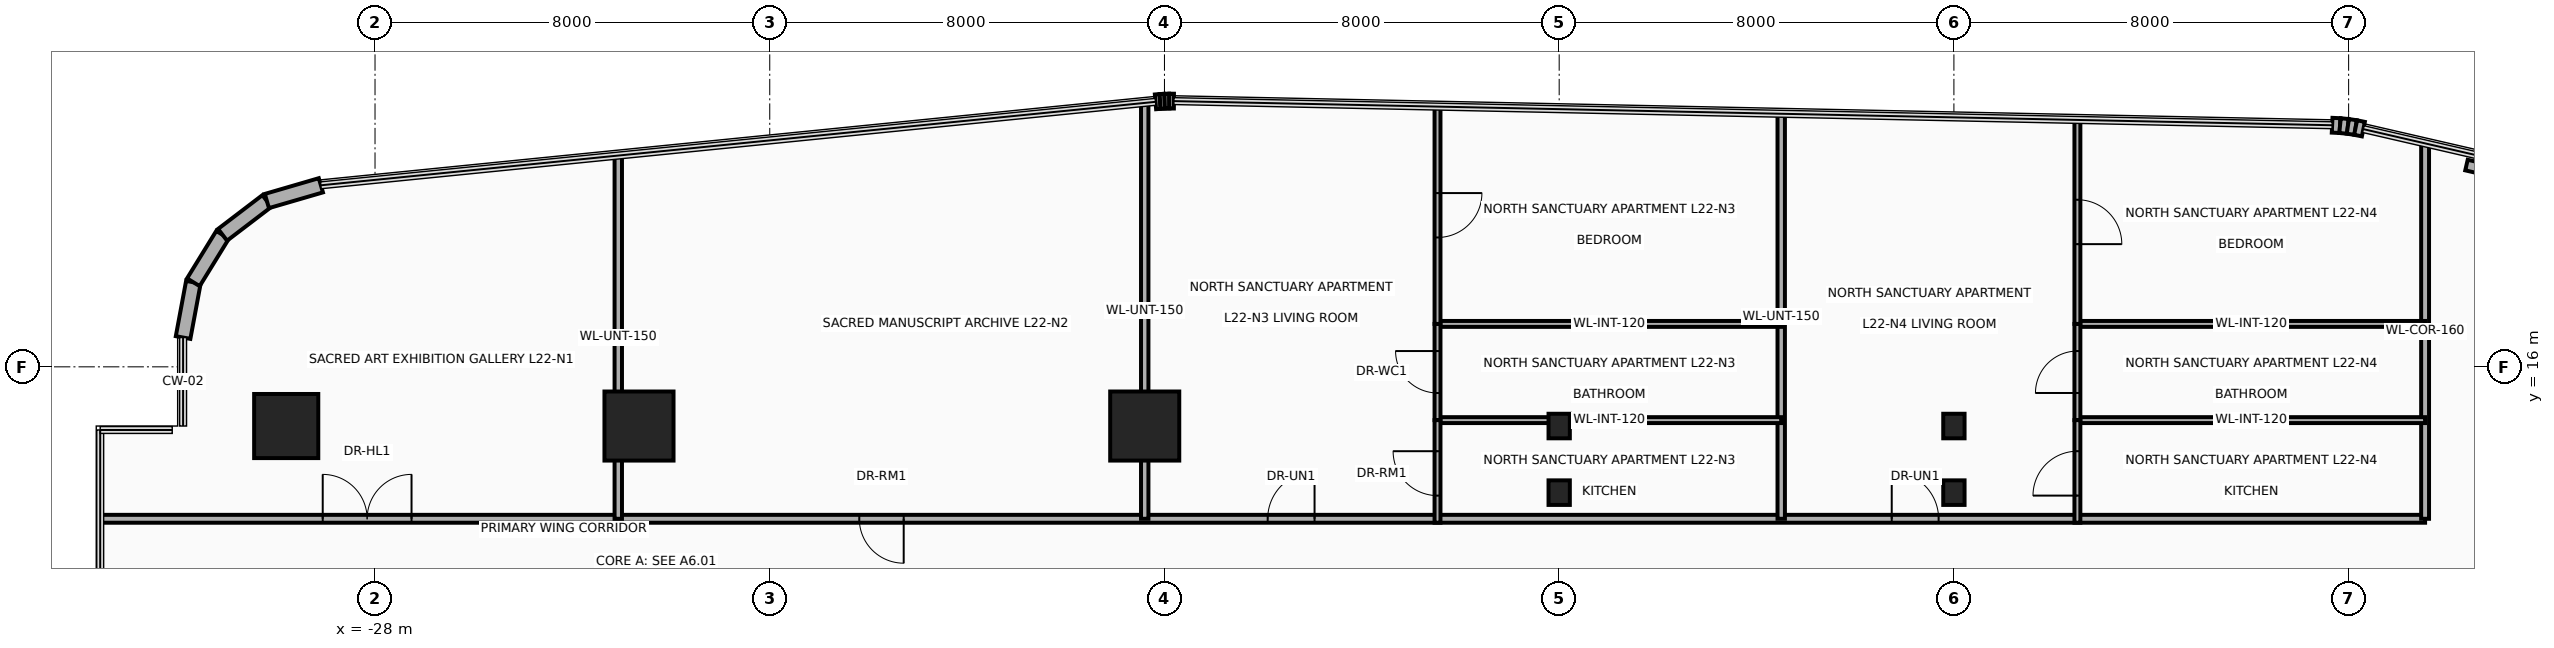
"""IFC4 building model, lengths in metres.
Left out: names, types, materials, properties, quantities, classifications, styles, units other than length and angle.
Written with IfcOpenShell. Run it as: python <this file> out.ifc"""

import sys

from ifc_helpers import new_model, si_unit, direction, frame, frame_2d, origin, origin_2d, place, context, subcontext, project, spatial, rectangle, circle, i_section, extrude, source, transform, mapped, element, fill, save


model = new_model("IFC4")
c1 = context("Model", 3, precision=1e-05, world=origin(), true_north=direction((0.0, 1.0)))
c2 = subcontext(c1, "Body", "Model", "MODEL_VIEW")
j1 = project(units=[si_unit("LENGTHUNIT", "METRE"), si_unit("PLANEANGLEUNIT", "RADIAN")], contexts=[c1])
p1 = place(None, origin())
s1 = spatial("IfcSite", under=j1, at=p1, CompositionType="ELEMENT")
p2 = place(p1, origin())
s2 = spatial("IfcBuilding", under=s1, at=p2, CompositionType="ELEMENT")
p3 = place(p2, frame((0.0, 0.0, 88.9)))
s3 = spatial("IfcBuildingStorey", under=s2, at=p3, CompositionType="ELEMENT", Elevation=88.9)
m1 = source(origin(), c2, "Body", "SweptSolid", [
    extrude(circle(Radius=0.65, at=origin_2d()), origin(), (0.0, 0.0, 1.0), 3.7),
])
p4 = place(p3, frame((-29.8, 14.8, 0.0), z_axis=(0.0, 0.0, 1.0), x_axis=(1.0, 0.0, 0.0)))
e1 = element("IfcColumn", 1, at=p4, inside=s3, PredefinedType="COLUMN", context=c2, shape_type="MappedRepresentation", body=[
    mapped(m1, transform((0.0, 0.0, 0.0), x_axis=(1.0, 0.0, 0.0), y_axis=(0.0, 1.0, 0.0), z_axis=(0.0, 0.0, 1.0), scale=1.0)),
])
m2 = source(origin(), c2, "Body", "SweptSolid", [
    extrude(rectangle(XDim=1.4, YDim=1.4, at=origin_2d()), origin(), (0.0, 0.0, 1.0), 3.7),
])
for number, where, z_axis, x_axis in (
    (2, (-22.65, 14.8, 0.0), (0.0, 0.0, 1.0), (1.0, 0.0, 0.0)),
    (3, (-12.4, 14.8, 0.0), (0.0, 0.0, 1.0), (1.0, 0.0, 0.0)),
):
    element("IfcColumn", number, at=place(p3, frame(where, z_axis=z_axis, x_axis=x_axis)), inside=s3, PredefinedType="COLUMN", context=c2, shape_type="MappedRepresentation", body=[
        mapped(m2, transform((0.0, 0.0, 0.0), x_axis=(1.0, 0.0, 0.0), y_axis=(0.0, 1.0, 0.0), z_axis=(0.0, 0.0, 1.0), scale=1.0)),
    ])
m3 = source(origin(), c2, "Body", "SweptSolid", [
    extrude(i_section(OverallWidth=0.432, OverallDepth=0.498, WebThickness=0.056, FlangeThickness=0.089, at=origin_2d()), origin(), (0.0, 0.0, 1.0), 3.7),
])
for number, where, z_axis, x_axis in (
    (4, (-4.0, 13.45, 0.0), (0.0, 0.0, 1.0), (1.0, 0.0, 0.0)),
    (5, (-4.0, 14.8, 0.0), (0.0, 0.0, 1.0), (1.0, 0.0, 0.0)),
    (6, (4.0, 13.45, 0.0), (0.0, 0.0, 1.0), (1.0, 0.0, 0.0)),
    (7, (4.0, 14.8, 0.0), (0.0, 0.0, 1.0), (1.0, 0.0, 0.0)),
):
    element("IfcColumn", number, at=place(p3, frame(where, z_axis=z_axis, x_axis=x_axis)), inside=s3, PredefinedType="COLUMN", context=c2, shape_type="MappedRepresentation", body=[
        mapped(m3, transform((0.0, 0.0, 0.0), x_axis=(1.0, 0.0, 0.0), y_axis=(0.0, 1.0, 0.0), z_axis=(0.0, 0.0, 1.0), scale=1.0)),
    ])
p5 = place(p3, frame((-31.89, 16.594, 0.0), z_axis=(0.0, 0.0, 1.0), x_axis=(0.182748995683, 0.9831596028, 0.0)))
e8 = element("IfcWall", 8, at=p5, inside=s3, PredefinedType="SOLIDWALL", context=c2, shape_type="SweptSolid", body=[
    extrude(rectangle(XDim=1.14, YDim=0.3, at=frame_2d((0.57, 0.0))), origin(), (0.0, 0.0, 1.0), 3.46),
])
p6 = place(p3, frame((-31.682, 17.714, 0.0), z_axis=(0.0, 0.0, 1.0), x_axis=(0.524157723014, 0.8516212077, 0.0)))
e9 = element("IfcWall", 9, at=p6, inside=s3, PredefinedType="SOLIDWALL", context=c2, shape_type="SweptSolid", body=[
    extrude(rectangle(XDim=1.129, YDim=0.3, at=frame_2d((0.565, 0.0))), origin(), (0.0, 0.0, 1.0), 3.46),
])
p7 = place(p3, frame((-31.09, 18.676, 0.0), z_axis=(0.0, 0.0, 1.0), x_axis=(0.795253002434, 0.606277710393, 0.0)))
e10 = element("IfcWall", 10, at=p7, inside=s3, PredefinedType="SOLIDWALL", context=c2, shape_type="SweptSolid", body=[
    extrude(rectangle(XDim=1.129, YDim=0.3, at=frame_2d((0.564, 0.0))), origin(), (0.0, 0.0, 1.0), 3.46),
])
p8 = place(p3, frame((-30.192, 19.361, 0.0), z_axis=(0.0, 0.0, 1.0), x_axis=(0.960071941549, 0.279753225271, 0.0)))
e11 = element("IfcWall", 11, at=p8, inside=s3, PredefinedType="SOLIDWALL", context=c2, shape_type="SweptSolid", body=[
    extrude(rectangle(XDim=1.14, YDim=0.3, at=frame_2d((0.57, 0.0))), origin(), (0.0, 0.0, 1.0), 3.46),
])
p9 = place(p3, frame((-12.182, 21.371, 0.0), z_axis=(0.0, 0.0, 1.0), x_axis=(0.996527790842, 0.08326080759, 0.0)))
e12 = element("IfcWall", 12, at=p9, inside=s3, PredefinedType="SOLIDWALL", context=c2, shape_type="SweptSolid", body=[
    extrude(rectangle(XDim=0.094, YDim=0.3, at=frame_2d((0.047, 0.0))), origin(), (0.0, 0.0, 1.0), 3.46),
])
p10 = place(p3, frame((-12.088, 21.379, 0.0), z_axis=(0.0, 0.0, 1.0), x_axis=(0.998476480444, 0.055178963393, 0.0)))
e13 = element("IfcWall", 13, at=p10, inside=s3, PredefinedType="SOLIDWALL", context=c2, shape_type="SweptSolid", body=[
    extrude(rectangle(XDim=0.093, YDim=0.3, at=frame_2d((0.046, 0.0))), origin(), (0.0, 0.0, 1.0), 3.46),
])
p11 = place(p3, frame((-11.996, 21.384, 0.0), z_axis=(0.0, 0.0, 1.0), x_axis=(0.999722573757, 0.023553673204, 0.0)))
e14 = element("IfcWall", 14, at=p11, inside=s3, PredefinedType="SOLIDWALL", context=c2, shape_type="SweptSolid", body=[
    extrude(rectangle(XDim=0.093, YDim=0.3, at=frame_2d((0.047, 0.0))), origin(), (0.0, 0.0, 1.0), 3.46),
])
p12 = place(p3, frame((-11.902, 21.386, 0.0), z_axis=(0.0, 0.0, 1.0), x_axis=(0.999986507273, -0.005194735103, 0.0)))
e15 = element("IfcWall", 15, at=p12, inside=s3, PredefinedType="SOLIDWALL", context=c2, shape_type="SweptSolid", body=[
    extrude(rectangle(XDim=0.094, YDim=0.3, at=frame_2d((0.047, 0.0))), origin(), (0.0, 0.0, 1.0), 3.46),
])
p13 = place(p3, frame((11.666, 20.897, 0.0), z_axis=(0.0, 0.0, 1.0), x_axis=(0.998885297239, -0.047203421059, 0.0)))
e16 = element("IfcWall", 16, at=p13, inside=s3, PredefinedType="SOLIDWALL", context=c2, shape_type="SweptSolid", body=[
    extrude(rectangle(XDim=0.16, YDim=0.3, at=frame_2d((0.08, 0.0))), origin(), (0.0, 0.0, 1.0), 3.46),
])
p14 = place(p3, frame((11.826, 20.889, 0.0), z_axis=(0.0, 0.0, 1.0), x_axis=(0.995172891136, -0.098137234257, 0.0)))
e17 = element("IfcWall", 17, at=p14, inside=s3, PredefinedType="SOLIDWALL", context=c2, shape_type="SweptSolid", body=[
    extrude(rectangle(XDim=0.159, YDim=0.3, at=frame_2d((0.08, 0.0))), origin(), (0.0, 0.0, 1.0), 3.46),
])
p15 = place(p3, frame((11.984, 20.874, 0.0), z_axis=(0.0, 0.0, 1.0), x_axis=(0.988846069207, -0.148941100486, 0.0)))
e18 = element("IfcWall", 18, at=p15, inside=s3, PredefinedType="SOLIDWALL", context=c2, shape_type="SweptSolid", body=[
    extrude(rectangle(XDim=0.159, YDim=0.3, at=frame_2d((0.08, 0.0))), origin(), (0.0, 0.0, 1.0), 3.46),
])
p16 = place(p3, frame((12.142, 20.85, 0.0), z_axis=(0.0, 0.0, 1.0), x_axis=(0.979991950448, -0.19903712482, 0.0)))
e19 = element("IfcWall", 19, at=p16, inside=s3, PredefinedType="SOLIDWALL", context=c2, shape_type="SweptSolid", body=[
    extrude(rectangle(XDim=0.161, YDim=0.3, at=frame_2d((0.08, 0.0))), origin(), (0.0, 0.0, 1.0), 3.46),
])
p17 = place(p3, frame((14.389, 20.09, 0.0), z_axis=(0.0, 0.0, 1.0), x_axis=(0.974400545997, -0.224818984875, 0.0)))
e20 = element("IfcWall", 20, at=p17, inside=s3, PredefinedType="SOLIDWALL", context=c2, shape_type="SweptSolid", body=[
    extrude(rectangle(XDim=2.2, YDim=0.22, at=frame_2d((1.1, 0.0))), origin(), (0.0, 0.0, 1.0), 3.46),
])
p18 = place(p17, frame((0.65, 0.0, 0.95)))
e21 = element("IfcOpeningElement", 21, at=p18, cuts=e20, PredefinedType="OPENING", context=c2, shape_type="SweptSolid", body=[
    extrude(rectangle(XDim=0.9, YDim=1.3, at=frame_2d((0.45, 0.65))), frame((0.0, 0.125, 0.0), z_axis=(0.0, -1.0, 0.0), x_axis=(1.0, 0.0, 0.0)), (0.0, 0.0, 1.0), 0.25),
])
p19 = place(p3, frame((-33.54, 12.92, 0.0), z_axis=(0.0, 0.0, 1.0), x_axis=(1.0, 0.0, 0.0)))
e22 = element("IfcWall", 22, at=p19, inside=s3, PredefinedType="PARTITIONING", context=c2, shape_type="SweptSolid", body=[
    extrude(rectangle(XDim=47.09, YDim=0.16, at=frame_2d((23.545, 0.0))), origin(), (0.0, 0.0, 1.0), 2.583),
])
p20 = place(p19, frame((4.48, 0.0, 0.0)))
e23 = element("IfcOpeningElement", 23, at=p20, cuts=e22, PredefinedType="OPENING", context=c2, shape_type="SweptSolid", body=[
    extrude(rectangle(XDim=1.8, YDim=2.15, at=frame_2d((0.9, 1.075))), frame((0.0, 0.095, 0.0), z_axis=(0.0, -1.0, 0.0), x_axis=(1.0, 0.0, 0.0)), (0.0, 0.0, 1.0), 0.19),
])
p21 = place(p19, frame((15.355, 0.0, 0.0)))
e24 = element("IfcOpeningElement", 24, at=p21, cuts=e22, PredefinedType="OPENING", context=c2, shape_type="SweptSolid", body=[
    extrude(rectangle(XDim=0.9, YDim=2.1, at=frame_2d((0.45, 1.05))), frame((0.0, 0.095, 0.0), z_axis=(0.0, -1.0, 0.0), x_axis=(1.0, 0.0, 0.0)), (0.0, 0.0, 1.0), 0.19),
])
p22 = place(p19, frame((23.632, 0.0, 0.0)))
e25 = element("IfcOpeningElement", 25, at=p22, cuts=e22, PredefinedType="OPENING", context=c2, shape_type="SweptSolid", body=[
    extrude(rectangle(XDim=0.95, YDim=2.15, at=frame_2d((0.475, 1.075))), frame((0.0, 0.095, 0.0), z_axis=(0.0, -1.0, 0.0), x_axis=(1.0, 0.0, 0.0)), (0.0, 0.0, 1.0), 0.19),
])
p23 = place(p19, frame((36.28, 0.0, 0.0)))
e26 = element("IfcOpeningElement", 26, at=p23, cuts=e22, PredefinedType="OPENING", context=c2, shape_type="SweptSolid", body=[
    extrude(rectangle(XDim=0.95, YDim=2.15, at=frame_2d((0.475, 1.075))), frame((0.0, 0.095, 0.0), z_axis=(0.0, -1.0, 0.0), x_axis=(1.0, 0.0, 0.0)), (0.0, 0.0, 1.0), 0.19),
])
p24 = place(p3, frame((13.55, 12.92, 0.0), z_axis=(0.0, 0.0, 1.0), x_axis=(0.0, 1.0, 0.0)))
e27 = element("IfcWall", 27, at=p24, inside=s3, PredefinedType="PARTITIONING", context=c2, shape_type="SweptSolid", body=[
    extrude(rectangle(XDim=7.609, YDim=0.16, at=frame_2d((3.805, 0.0))), origin(), (0.0, 0.0, 1.0), 2.583),
])
p25 = place(p3, frame((-12.4, 12.92, 0.0), z_axis=(0.0, 0.0, 1.0), x_axis=(0.0, 1.0, 0.0)))
e28 = element("IfcWall", 28, at=p25, inside=s3, PredefinedType="PARTITIONING", context=c2, shape_type="SweptSolid", body=[
    extrude(rectangle(XDim=8.43, YDim=0.15, at=frame_2d((4.215, 0.0))), origin(), (0.0, 0.0, 1.0), 2.583),
])
p26 = place(p3, frame((-23.07, 12.92, 0.0), z_axis=(0.0, 0.0, 1.0), x_axis=(0.0, 1.0, 0.0)))
e29 = element("IfcWall", 29, at=p26, inside=s3, PredefinedType="PARTITIONING", context=c2, shape_type="SweptSolid", body=[
    extrude(rectangle(XDim=7.363, YDim=0.15, at=frame_2d((3.681, 0.0))), origin(), (0.0, 0.0, 1.0), 2.583),
])
p27 = place(p3, frame((0.5, 12.92, 0.0), z_axis=(0.0, 0.0, 1.0), x_axis=(0.0, 1.0, 0.0)))
e30 = element("IfcWall", 30, at=p27, inside=s3, PredefinedType="PARTITIONING", context=c2, shape_type="SweptSolid", body=[
    extrude(rectangle(XDim=8.21, YDim=0.15, at=frame_2d((4.105, 0.0))), origin(), (0.0, 0.0, 1.0), 2.583),
])
p28 = place(p3, frame((-6.466, 14.92, 0.0), z_axis=(0.0, 0.0, 1.0), x_axis=(1.0, 0.0, 0.0)))
e31 = element("IfcWall", 31, at=p28, inside=s3, PredefinedType="PARTITIONING", context=c2, shape_type="SweptSolid", body=[
    extrude(rectangle(XDim=6.966, YDim=0.12, at=frame_2d((3.483, 0.0))), origin(), (0.0, 0.0, 1.0), 2.583),
])
p29 = place(p3, frame((-6.466, 16.87, 0.0), z_axis=(0.0, 0.0, 1.0), x_axis=(1.0, 0.0, 0.0)))
e32 = element("IfcWall", 32, at=p29, inside=s3, PredefinedType="PARTITIONING", context=c2, shape_type="SweptSolid", body=[
    extrude(rectangle(XDim=6.966, YDim=0.12, at=frame_2d((3.483, 0.0))), origin(), (0.0, 0.0, 1.0), 3.46),
])
p30 = place(p3, frame((-6.466, 14.92, 0.0), z_axis=(0.0, 0.0, 1.0), x_axis=(0.0, 1.0, 0.0)))
e33 = element("IfcWall", 33, at=p30, inside=s3, PredefinedType="PARTITIONING", context=c2, shape_type="SweptSolid", body=[
    extrude(rectangle(XDim=1.95, YDim=0.12, at=frame_2d((0.975, 0.0))), origin(), (0.0, 0.0, 1.0), 2.583),
])
p31 = place(p30, frame((0.55, 0.0, 0.0)))
e34 = element("IfcOpeningElement", 34, at=p31, cuts=e33, PredefinedType="OPENING", context=c2, shape_type="SweptSolid", body=[
    extrude(rectangle(XDim=0.85, YDim=2.1, at=frame_2d((0.425, 1.05))), frame((0.0, 0.075, 0.0), z_axis=(0.0, -1.0, 0.0), x_axis=(1.0, 0.0, 0.0)), (0.0, 0.0, 1.0), 0.15),
])
p32 = place(p3, frame((-6.466, 12.84, 0.0), z_axis=(0.0, 0.0, 1.0), x_axis=(0.0, 1.0, 0.0)))
e35 = element("IfcWall", 35, at=p32, inside=s3, PredefinedType="PARTITIONING", context=c2, shape_type="SweptSolid", body=[
    extrude(rectangle(XDim=2.08, YDim=0.12, at=frame_2d((1.04, 0.0))), origin(), (0.0, 0.0, 1.0), 2.583),
])
p33 = place(p32, frame((0.55, 0.0, 0.0)))
e36 = element("IfcOpeningElement", 36, at=p33, cuts=e35, PredefinedType="OPENING", context=c2, shape_type="SweptSolid", body=[
    extrude(rectangle(XDim=0.9, YDim=2.1, at=frame_2d((0.45, 1.05))), frame((0.0, 0.075, 0.0), z_axis=(0.0, -1.0, 0.0), x_axis=(1.0, 0.0, 0.0)), (0.0, 0.0, 1.0), 0.15),
])
p34 = place(p3, frame((-6.466, 16.87, 0.0), z_axis=(0.0, 0.0, 1.0), x_axis=(0.0, 1.0, 0.0)))
e37 = element("IfcWall", 37, at=p34, inside=s3, PredefinedType="PARTITIONING", context=c2, shape_type="SweptSolid", body=[
    extrude(rectangle(XDim=4.405, YDim=0.12, at=frame_2d((2.202, 0.0))), origin(), (0.0, 0.0, 1.0), 3.46),
])
p35 = place(p34, frame((1.752, 0.0, 0.0)))
e38 = element("IfcOpeningElement", 38, at=p35, cuts=e37, PredefinedType="OPENING", context=c2, shape_type="SweptSolid", body=[
    extrude(rectangle(XDim=0.9, YDim=2.1, at=frame_2d((0.45, 1.05))), frame((0.0, 0.075, 0.0), z_axis=(0.0, -1.0, 0.0), x_axis=(1.0, 0.0, 0.0)), (0.0, 0.0, 1.0), 0.15),
])
for number, where, z_axis, x_axis in (
    (39, (6.503, 14.92, 0.0), (0.0, 0.0, 1.0), (1.0, 0.0, 0.0)),
    (40, (6.503, 16.87, 0.0), (0.0, 0.0, 1.0), (1.0, 0.0, 0.0)),
):
    element("IfcWall", number, at=place(p3, frame(where, z_axis=z_axis, x_axis=x_axis)), inside=s3, PredefinedType="PARTITIONING", context=c2, shape_type="SweptSolid", body=[
        extrude(rectangle(XDim=7.047, YDim=0.12, at=frame_2d((3.523, 0.0))), origin(), (0.0, 0.0, 1.0), 3.46),
    ])
p36 = place(p3, frame((6.503, 14.92, 0.0), z_axis=(0.0, 0.0, 1.0), x_axis=(0.0, 1.0, 0.0)))
e41 = element("IfcWall", 41, at=p36, inside=s3, PredefinedType="PARTITIONING", context=c2, shape_type="SweptSolid", body=[
    extrude(rectangle(XDim=1.95, YDim=0.12, at=frame_2d((0.975, 0.0))), origin(), (0.0, 0.0, 1.0), 3.46),
])
p37 = place(p36, frame((0.55, 0.0, 0.0)))
e42 = element("IfcOpeningElement", 42, at=p37, cuts=e41, PredefinedType="OPENING", context=c2, shape_type="SweptSolid", body=[
    extrude(rectangle(XDim=0.85, YDim=2.1, at=frame_2d((0.425, 1.05))), frame((0.0, 0.075, 0.0), z_axis=(0.0, -1.0, 0.0), x_axis=(1.0, 0.0, 0.0)), (0.0, 0.0, 1.0), 0.15),
])
p38 = place(p3, frame((6.503, 12.84, 0.0), z_axis=(0.0, 0.0, 1.0), x_axis=(0.0, 1.0, 0.0)))
e43 = element("IfcWall", 43, at=p38, inside=s3, PredefinedType="PARTITIONING", context=c2, shape_type="SweptSolid", body=[
    extrude(rectangle(XDim=2.08, YDim=0.12, at=frame_2d((1.04, 0.0))), origin(), (0.0, 0.0, 1.0), 2.583),
])
p39 = place(p38, frame((0.55, 0.0, 0.0)))
e44 = element("IfcOpeningElement", 44, at=p39, cuts=e43, PredefinedType="OPENING", context=c2, shape_type="SweptSolid", body=[
    extrude(rectangle(XDim=0.9, YDim=2.1, at=frame_2d((0.45, 1.05))), frame((0.0, 0.075, 0.0), z_axis=(0.0, -1.0, 0.0), x_axis=(1.0, 0.0, 0.0)), (0.0, 0.0, 1.0), 0.15),
])
p40 = place(p3, frame((6.503, 16.87, 0.0), z_axis=(0.0, 0.0, 1.0), x_axis=(0.0, 1.0, 0.0)))
e45 = element("IfcWall", 45, at=p40, inside=s3, PredefinedType="PARTITIONING", context=c2, shape_type="SweptSolid", body=[
    extrude(rectangle(XDim=4.134, YDim=0.12, at=frame_2d((2.067, 0.0))), origin(), (0.0, 0.0, 1.0), 3.46),
])
p41 = place(p40, frame((1.617, 0.0, 0.0)))
e46 = element("IfcOpeningElement", 46, at=p41, cuts=e45, PredefinedType="OPENING", context=c2, shape_type="SweptSolid", body=[
    extrude(rectangle(XDim=0.9, YDim=2.1, at=frame_2d((0.45, 1.05))), frame((0.0, 0.075, 0.0), z_axis=(0.0, -1.0, 0.0), x_axis=(1.0, 0.0, 0.0)), (0.0, 0.0, 1.0), 0.15),
])
p42 = place(p20, origin())
e47 = element("IfcDoor", 47, at=p42, inside=s3, OperationType="DOUBLE_DOOR_SINGLE_SWING", PredefinedType="DOOR", context=c2, shape_type="SweptSolid", body=[
    extrude(rectangle(XDim=1.8, YDim=2.15, at=frame_2d((0.9, 1.075))), frame((0.0, 0.025, 0.0), z_axis=(0.0, -1.0, 0.0), x_axis=(1.0, 0.0, 0.0)), (0.0, 0.0, 1.0), 0.05),
])
fill(e23, e47)
p43 = place(p21, frame((0.9, 0.0, 0.0), z_axis=(0.0, 0.0, 1.0), x_axis=(-1.0, 0.0, 0.0)))
e48 = element("IfcDoor", 48, at=p43, inside=s3, OperationType="SINGLE_SWING_LEFT", PredefinedType="DOOR", context=c2, shape_type="SweptSolid", body=[
    extrude(rectangle(XDim=0.9, YDim=2.1, at=frame_2d((0.45, 1.05))), frame((0.0, 0.025, 0.0), z_axis=(0.0, -1.0, 0.0), x_axis=(1.0, 0.0, 0.0)), (0.0, 0.0, 1.0), 0.05),
])
fill(e24, e48)
p44 = place(p22, origin())
e49 = element("IfcDoor", 49, at=p44, inside=s3, OperationType="SINGLE_SWING_RIGHT", PredefinedType="DOOR", context=c2, shape_type="SweptSolid", body=[
    extrude(rectangle(XDim=0.95, YDim=2.15, at=frame_2d((0.475, 1.075))), frame((0.0, 0.025, 0.0), z_axis=(0.0, -1.0, 0.0), x_axis=(1.0, 0.0, 0.0)), (0.0, 0.0, 1.0), 0.05),
])
fill(e25, e49)
p45 = place(p31, origin())
e50 = element("IfcDoor", 50, at=p45, inside=s3, OperationType="SINGLE_SWING_LEFT", PredefinedType="DOOR", context=c2, shape_type="SweptSolid", body=[
    extrude(rectangle(XDim=0.85, YDim=2.1, at=frame_2d((0.425, 1.05))), frame((0.0, 0.025, 0.0), z_axis=(0.0, -1.0, 0.0), x_axis=(1.0, 0.0, 0.0)), (0.0, 0.0, 1.0), 0.05),
])
fill(e34, e50)
p46 = place(p33, origin())
e51 = element("IfcDoor", 51, at=p46, inside=s3, OperationType="SINGLE_SWING_RIGHT", PredefinedType="DOOR", context=c2, shape_type="SweptSolid", body=[
    extrude(rectangle(XDim=0.9, YDim=2.1, at=frame_2d((0.45, 1.05))), frame((0.0, 0.025, 0.0), z_axis=(0.0, -1.0, 0.0), x_axis=(1.0, 0.0, 0.0)), (0.0, 0.0, 1.0), 0.05),
])
fill(e36, e51)
p47 = place(p35, frame((0.9, 0.0, 0.0), z_axis=(0.0, 0.0, 1.0), x_axis=(-1.0, 0.0, 0.0)))
e52 = element("IfcDoor", 52, at=p47, inside=s3, OperationType="SINGLE_SWING_LEFT", PredefinedType="DOOR", context=c2, shape_type="SweptSolid", body=[
    extrude(rectangle(XDim=0.9, YDim=2.1, at=frame_2d((0.45, 1.05))), frame((0.0, 0.025, 0.0), z_axis=(0.0, -1.0, 0.0), x_axis=(1.0, 0.0, 0.0)), (0.0, 0.0, 1.0), 0.05),
])
fill(e38, e52)
p48 = place(p23, origin())
e53 = element("IfcDoor", 53, at=p48, inside=s3, OperationType="SINGLE_SWING_RIGHT", PredefinedType="DOOR", context=c2, shape_type="SweptSolid", body=[
    extrude(rectangle(XDim=0.95, YDim=2.15, at=frame_2d((0.475, 1.075))), frame((0.0, 0.025, 0.0), z_axis=(0.0, -1.0, 0.0), x_axis=(1.0, 0.0, 0.0)), (0.0, 0.0, 1.0), 0.05),
])
fill(e26, e53)
p49 = place(p37, origin())
e54 = element("IfcDoor", 54, at=p49, inside=s3, OperationType="SINGLE_SWING_LEFT", PredefinedType="DOOR", context=c2, shape_type="SweptSolid", body=[
    extrude(rectangle(XDim=0.85, YDim=2.1, at=frame_2d((0.425, 1.05))), frame((0.0, 0.025, 0.0), z_axis=(0.0, -1.0, 0.0), x_axis=(1.0, 0.0, 0.0)), (0.0, 0.0, 1.0), 0.05),
])
fill(e42, e54)
p50 = place(p39, origin())
e55 = element("IfcDoor", 55, at=p50, inside=s3, OperationType="SINGLE_SWING_RIGHT", PredefinedType="DOOR", context=c2, shape_type="SweptSolid", body=[
    extrude(rectangle(XDim=0.9, YDim=2.1, at=frame_2d((0.45, 1.05))), frame((0.0, 0.025, 0.0), z_axis=(0.0, -1.0, 0.0), x_axis=(1.0, 0.0, 0.0)), (0.0, 0.0, 1.0), 0.05),
])
fill(e44, e55)
p51 = place(p41, frame((0.9, 0.0, 0.0), z_axis=(0.0, 0.0, 1.0), x_axis=(-1.0, 0.0, 0.0)))
e56 = element("IfcDoor", 56, at=p51, inside=s3, OperationType="SINGLE_SWING_LEFT", PredefinedType="DOOR", context=c2, shape_type="SweptSolid", body=[
    extrude(rectangle(XDim=0.9, YDim=2.1, at=frame_2d((0.45, 1.05))), frame((0.0, 0.025, 0.0), z_axis=(0.0, -1.0, 0.0), x_axis=(1.0, 0.0, 0.0)), (0.0, 0.0, 1.0), 0.05),
])
fill(e46, e56)
save(model, sys.argv[1])
